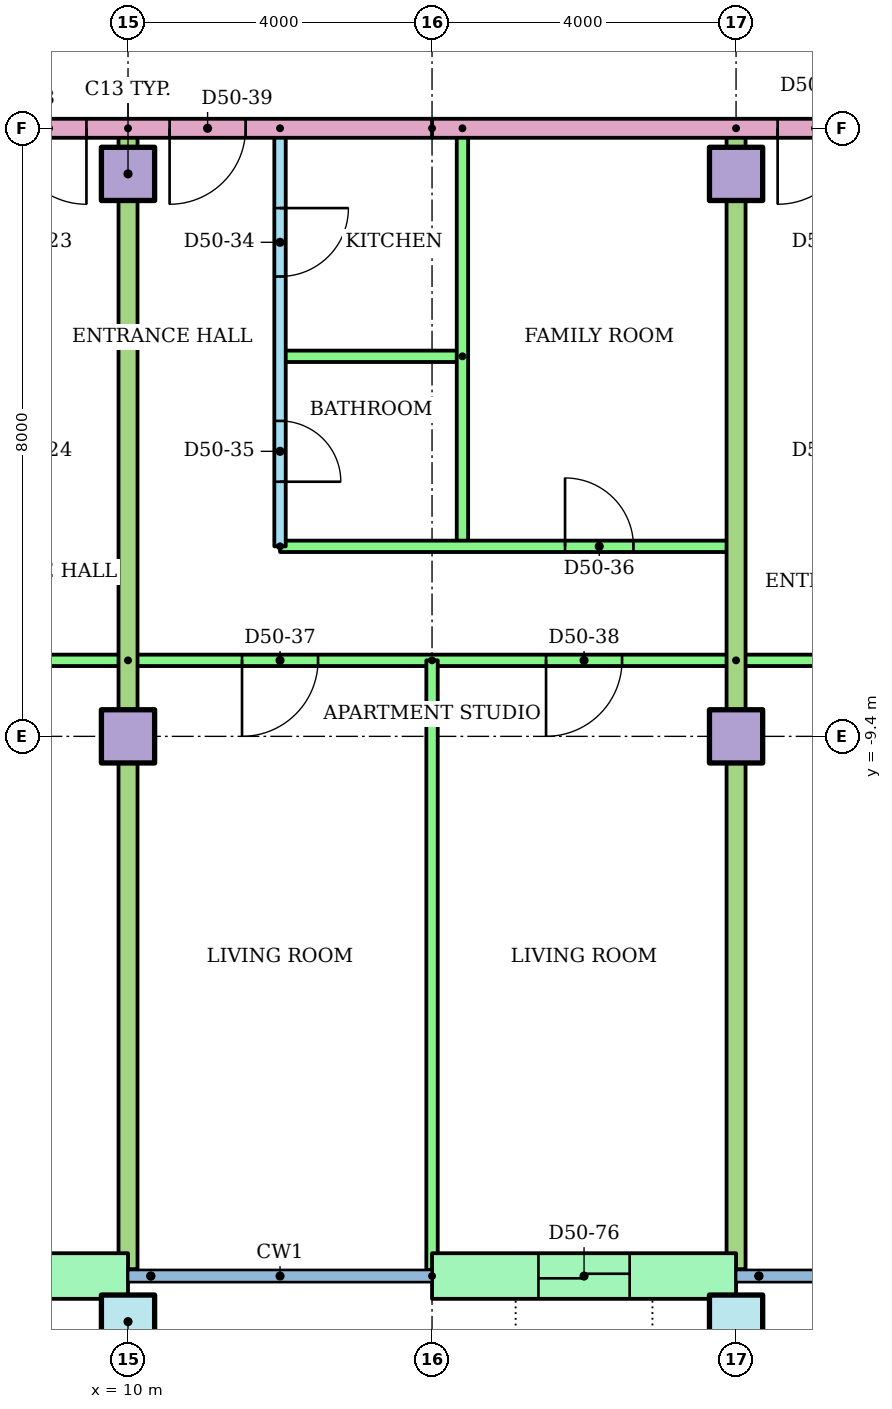
"""IFC4 building model, lengths in metres.
Left out: names, types, materials, properties, quantities, classifications, styles, units other than length and angle.
Written with IfcOpenShell. Run it as: python <this file> out.ifc"""

import sys

from ifc_helpers import new_model, si_unit, direction, frame, frame_2d, origin, origin_2d, place, context, subcontext, project, spatial, rectangle, hollow_rectangle, extrude, element, fill, save


model = new_model("IFC4")
c1 = context("Model", 3, precision=1e-05, world=origin(), true_north=direction((0.0, 1.0)))
c2 = subcontext(c1, "Body", "Model", "MODEL_VIEW")
j1 = project(units=[si_unit("LENGTHUNIT", "METRE"), si_unit("PLANEANGLEUNIT", "RADIAN")], contexts=[c1])
p1 = place(None, origin())
s1 = spatial("IfcSite", under=j1, at=p1, CompositionType="ELEMENT")
p2 = place(p1, origin())
s2 = spatial("IfcBuilding", under=s1, at=p2, CompositionType="ELEMENT")
p3 = place(p2, frame((0.0, 0.0, 190.9)))
s3 = spatial("IfcBuildingStorey", under=s2, at=p3, CompositionType="ELEMENT", Elevation=190.9)
for number, where in (
    (1, (10.0, -17.1, 0.0)),
    (2, (18.0, -17.1, 0.0)),
):
    element("IfcColumn", number, at=place(p3, frame(where)), inside=s3, PredefinedType="COLUMN", context=c2, shape_type="SweptSolid", body=[
        extrude(hollow_rectangle(XDim=0.7, YDim=0.7, WallThickness=0.036, at=origin_2d()), origin(), (0.0, 0.0, 1.0), 3.2),
    ])
for number, where in (
    (3, (10.0, -9.4, 0.0)),
    (4, (18.0, -9.4, 0.0)),
    (5, (10.0, -2.0, 0.0)),
    (6, (18.0, -2.0, 0.0)),
):
    element("IfcColumn", number, at=place(p3, frame(where)), inside=s3, PredefinedType="COLUMN", context=c2, shape_type="SweptSolid", body=[
        extrude(rectangle(XDim=0.7, YDim=0.7, at=origin_2d()), origin(), (0.0, 0.0, 1.0), 3.2),
    ])
p4 = place(p3, frame((6.0, -16.5, 0.0)))
e7 = element("IfcWall", 7, at=p4, inside=s3, PredefinedType="STANDARD", context=c2, shape_type="SweptSolid", body=[
    extrude(rectangle(XDim=4.0, YDim=0.6, at=frame_2d((2.0, 0.0))), origin(), (0.0, 0.0, 1.0), 2.8),
])
p5 = place(p4, frame((1.4, 0.0, 0.0)))
e8 = element("IfcOpeningElement", 8, at=p5, cuts=e7, PredefinedType="OPENING", context=c2, shape_type="SweptSolid", body=[
    extrude(rectangle(XDim=1.2, YDim=2.1, at=frame_2d((0.6, 1.05))), frame((0.0, 0.31, 0.0), z_axis=(0.0, -1.0, 0.0), x_axis=(1.0, 0.0, 0.0)), (0.0, 0.0, 1.0), 0.62),
])
p6 = place(p3, frame((14.0, -16.5, 0.0)))
e9 = element("IfcWall", 9, at=p6, inside=s3, PredefinedType="STANDARD", context=c2, shape_type="SweptSolid", body=[
    extrude(rectangle(XDim=4.0, YDim=0.6, at=frame_2d((2.0, 0.0))), origin(), (0.0, 0.0, 1.0), 2.8),
])
p7 = place(p6, frame((1.4, 0.0, 0.0)))
e10 = element("IfcOpeningElement", 10, at=p7, cuts=e9, PredefinedType="OPENING", context=c2, shape_type="SweptSolid", body=[
    extrude(rectangle(XDim=1.2, YDim=2.1, at=frame_2d((0.6, 1.05))), frame((0.0, 0.31, 0.0), z_axis=(0.0, -1.0, 0.0), x_axis=(1.0, 0.0, 0.0)), (0.0, 0.0, 1.0), 0.62),
])
p8 = place(p3, frame((10.0, -8.4, 0.0), z_axis=(0.0, 0.0, 1.0), x_axis=(-1.0, 0.0, 0.0)))
e11 = element("IfcWall", 11, at=p8, inside=s3, PredefinedType="PARTITIONING", context=c2, shape_type="SweptSolid", body=[
    extrude(rectangle(XDim=24.0, YDim=0.15, at=frame_2d((12.0, 0.0))), origin(), (0.0, 0.0, 1.0), 2.4),
])
p9 = place(p8, frame((19.5, 0.0, 0.0)))
e12 = element("IfcOpeningElement", 12, at=p9, cuts=e11, PredefinedType="OPENING", context=c2, shape_type="SweptSolid", body=[
    extrude(rectangle(XDim=1.0, YDim=2.1, at=frame_2d((0.5, 1.05))), frame((0.0, 0.085, 0.0), z_axis=(0.0, -1.0, 0.0), x_axis=(1.0, 0.0, 0.0)), (0.0, 0.0, 1.0), 0.17),
])
p10 = place(p8, frame((13.55, 0.0, 0.0)))
e13 = element("IfcOpeningElement", 13, at=p10, cuts=e11, PredefinedType="OPENING", context=c2, shape_type="SweptSolid", body=[
    extrude(rectangle(XDim=0.9, YDim=2.1, at=frame_2d((0.45, 1.05))), frame((0.0, 0.085, 0.0), z_axis=(0.0, -1.0, 0.0), x_axis=(1.0, 0.0, 0.0)), (0.0, 0.0, 1.0), 0.17),
])
p11 = place(p8, frame((9.55, 0.0, 0.0)))
e14 = element("IfcOpeningElement", 14, at=p11, cuts=e11, PredefinedType="OPENING", context=c2, shape_type="SweptSolid", body=[
    extrude(rectangle(XDim=0.9, YDim=2.1, at=frame_2d((0.45, 1.05))), frame((0.0, 0.085, 0.0), z_axis=(0.0, -1.0, 0.0), x_axis=(1.0, 0.0, 0.0)), (0.0, 0.0, 1.0), 0.17),
])
p12 = place(p8, frame((5.55, 0.0, 0.0)))
e15 = element("IfcOpeningElement", 15, at=p12, cuts=e11, PredefinedType="OPENING", context=c2, shape_type="SweptSolid", body=[
    extrude(rectangle(XDim=0.9, YDim=2.1, at=frame_2d((0.45, 1.05))), frame((0.0, 0.085, 0.0), z_axis=(0.0, -1.0, 0.0), x_axis=(1.0, 0.0, 0.0)), (0.0, 0.0, 1.0), 0.17),
])
p13 = place(p8, frame((1.55, 0.0, 0.0)))
e16 = element("IfcOpeningElement", 16, at=p13, cuts=e11, PredefinedType="OPENING", context=c2, shape_type="SweptSolid", body=[
    extrude(rectangle(XDim=0.9, YDim=2.1, at=frame_2d((0.45, 1.05))), frame((0.0, 0.085, 0.0), z_axis=(0.0, -1.0, 0.0), x_axis=(1.0, 0.0, 0.0)), (0.0, 0.0, 1.0), 0.17),
])
p14 = place(p3, frame((12.0, -1.4, 0.0), z_axis=(0.0, 0.0, 1.0), x_axis=(0.0, -1.0, 0.0)))
e17 = element("IfcWall", 17, at=p14, inside=s3, PredefinedType="PARTITIONING", context=c2, shape_type="SweptSolid", body=[
    extrude(rectangle(XDim=5.5, YDim=0.15, at=frame_2d((2.75, 0.0))), origin(), (0.0, 0.0, 1.0), 2.4),
])
p15 = place(p14, frame((1.05, 0.0, 0.0)))
e18 = element("IfcOpeningElement", 18, at=p15, cuts=e17, PredefinedType="OPENING", context=c2, shape_type="SweptSolid", body=[
    extrude(rectangle(XDim=0.9, YDim=2.1, at=frame_2d((0.45, 1.05))), frame((0.0, 0.085, 0.0), z_axis=(0.0, -1.0, 0.0), x_axis=(1.0, 0.0, 0.0)), (0.0, 0.0, 1.0), 0.17),
])
p16 = place(p14, frame((3.85, 0.0, 0.0)))
e19 = element("IfcOpeningElement", 19, at=p16, cuts=e17, PredefinedType="OPENING", context=c2, shape_type="SweptSolid", body=[
    extrude(rectangle(XDim=0.8, YDim=2.1, at=frame_2d((0.4, 1.05))), frame((0.0, 0.085, 0.0), z_axis=(0.0, -1.0, 0.0), x_axis=(1.0, 0.0, 0.0)), (0.0, 0.0, 1.0), 0.17),
])
p17 = place(p3, frame((14.4, -4.4, 0.0), z_axis=(0.0, 0.0, 1.0), x_axis=(-1.0, 0.0, 0.0)))
e20 = element("IfcWall", 20, at=p17, inside=s3, PredefinedType="PARTITIONING", context=c2, shape_type="SweptSolid", body=[
    extrude(rectangle(XDim=2.4, YDim=0.15, at=frame_2d((1.2, 0.0))), origin(), (0.0, 0.0, 1.0), 2.4),
])
p18 = place(p3, frame((14.4, -1.4, 0.0), z_axis=(0.0, 0.0, 1.0), x_axis=(0.0, -1.0, 0.0)))
e21 = element("IfcWall", 21, at=p18, inside=s3, PredefinedType="PARTITIONING", context=c2, shape_type="SweptSolid", body=[
    extrude(rectangle(XDim=5.5, YDim=0.15, at=frame_2d((2.75, 0.0))), origin(), (0.0, 0.0, 1.0), 2.4),
])
p19 = place(p3, frame((12.0, -6.9, 0.0)))
e22 = element("IfcWall", 22, at=p19, inside=s3, PredefinedType="PARTITIONING", context=c2, shape_type="SweptSolid", body=[
    extrude(rectangle(XDim=6.0, YDim=0.15, at=frame_2d((3.0, 0.0))), origin(), (0.0, 0.0, 1.0), 2.4),
])
p20 = place(p19, frame((3.75, 0.0, 0.0)))
e23 = element("IfcOpeningElement", 23, at=p20, cuts=e22, PredefinedType="OPENING", context=c2, shape_type="SweptSolid", body=[
    extrude(rectangle(XDim=0.9, YDim=2.1, at=frame_2d((0.45, 1.05))), frame((0.0, 0.085, 0.0), z_axis=(0.0, -1.0, 0.0), x_axis=(1.0, 0.0, 0.0)), (0.0, 0.0, 1.0), 0.17),
])
p21 = place(p3, frame((18.0, -8.4, 0.0), z_axis=(0.0, 0.0, 1.0), x_axis=(-1.0, 0.0, 0.0)))
e24 = element("IfcWall", 24, at=p21, inside=s3, PredefinedType="PARTITIONING", context=c2, shape_type="SweptSolid", body=[
    extrude(rectangle(XDim=8.0, YDim=0.15, at=frame_2d((4.0, 0.0))), origin(), (0.0, 0.0, 1.0), 2.4),
])
p22 = place(p21, frame((5.5, 0.0, 0.0)))
e25 = element("IfcOpeningElement", 25, at=p22, cuts=e24, PredefinedType="OPENING", context=c2, shape_type="SweptSolid", body=[
    extrude(rectangle(XDim=1.0, YDim=2.1, at=frame_2d((0.5, 1.05))), frame((0.0, 0.085, 0.0), z_axis=(0.0, -1.0, 0.0), x_axis=(1.0, 0.0, 0.0)), (0.0, 0.0, 1.0), 0.17),
])
p23 = place(p21, frame((1.5, 0.0, 0.0)))
e26 = element("IfcOpeningElement", 26, at=p23, cuts=e24, PredefinedType="OPENING", context=c2, shape_type="SweptSolid", body=[
    extrude(rectangle(XDim=1.0, YDim=2.1, at=frame_2d((0.5, 1.05))), frame((0.0, 0.085, 0.0), z_axis=(0.0, -1.0, 0.0), x_axis=(1.0, 0.0, 0.0)), (0.0, 0.0, 1.0), 0.17),
])
p24 = place(p3, frame((14.0, -8.4, 0.0), z_axis=(0.0, 0.0, 1.0), x_axis=(0.0, -1.0, 0.0)))
e27 = element("IfcWall", 27, at=p24, inside=s3, PredefinedType="PARTITIONING", context=c2, shape_type="SweptSolid", body=[
    extrude(rectangle(XDim=8.021, YDim=0.15, at=frame_2d((4.01, 0.0))), origin(), (0.0, 0.0, 1.0), 2.4),
])
p25 = place(p3, frame((10.0, -1.4, 0.0), z_axis=(0.0, 0.0, 1.0), x_axis=(0.0, -1.0, 0.0)))
e28 = element("IfcWall", 28, at=p25, inside=s3, PredefinedType="PARTITIONING", context=c2, shape_type="SweptSolid", body=[
    extrude(rectangle(XDim=15.01, YDim=0.25, at=frame_2d((7.505, 0.0))), origin(), (0.0, 0.0, 1.0), 2.4),
])
p26 = place(p3, frame((36.82, -8.4, 0.0), z_axis=(0.0, 0.0, 1.0), x_axis=(-1.0, 0.0, 0.0)))
e29 = element("IfcWall", 29, at=p26, inside=s3, PredefinedType="PARTITIONING", context=c2, shape_type="SweptSolid", body=[
    extrude(rectangle(XDim=18.82, YDim=0.15, at=frame_2d((9.41, 0.0))), origin(), (0.0, 0.0, 1.0), 2.4),
])
p27 = place(p26, frame((16.37, 0.0, 0.0)))
e30 = element("IfcOpeningElement", 30, at=p27, cuts=e29, PredefinedType="OPENING", context=c2, shape_type="SweptSolid", body=[
    extrude(rectangle(XDim=0.9, YDim=2.1, at=frame_2d((0.45, 1.05))), frame((0.0, 0.085, 0.0), z_axis=(0.0, -1.0, 0.0), x_axis=(1.0, 0.0, 0.0)), (0.0, 0.0, 1.0), 0.17),
])
p28 = place(p26, frame((12.37, 0.0, 0.0)))
e31 = element("IfcOpeningElement", 31, at=p28, cuts=e29, PredefinedType="OPENING", context=c2, shape_type="SweptSolid", body=[
    extrude(rectangle(XDim=0.9, YDim=2.1, at=frame_2d((0.45, 1.05))), frame((0.0, 0.085, 0.0), z_axis=(0.0, -1.0, 0.0), x_axis=(1.0, 0.0, 0.0)), (0.0, 0.0, 1.0), 0.17),
])
p29 = place(p26, frame((7.27, 0.0, 0.0)))
e32 = element("IfcOpeningElement", 32, at=p29, cuts=e29, PredefinedType="OPENING", context=c2, shape_type="SweptSolid", body=[
    extrude(rectangle(XDim=1.0, YDim=2.1, at=frame_2d((0.5, 1.05))), frame((0.0, 0.085, 0.0), z_axis=(0.0, -1.0, 0.0), x_axis=(1.0, 0.0, 0.0)), (0.0, 0.0, 1.0), 0.17),
])
p30 = place(p26, frame((1.373, 0.0, 0.0)))
e33 = element("IfcOpeningElement", 33, at=p30, cuts=e29, PredefinedType="OPENING", context=c2, shape_type="SweptSolid", body=[
    extrude(rectangle(XDim=0.9, YDim=2.1, at=frame_2d((0.45, 1.05))), frame((0.0, 0.085, 0.0), z_axis=(0.0, -1.0, 0.0), x_axis=(1.0, 0.0, 0.0)), (0.0, 0.0, 1.0), 0.17),
])
p31 = place(p3, frame((18.0, -1.4, 0.0), z_axis=(0.0, 0.0, 1.0), x_axis=(0.0, -1.0, 0.0)))
e34 = element("IfcWall", 34, at=p31, inside=s3, PredefinedType="PARTITIONING", context=c2, shape_type="SweptSolid", body=[
    extrude(rectangle(XDim=15.01, YDim=0.25, at=frame_2d((7.505, 0.0))), origin(), (0.0, 0.0, 1.0), 2.4),
])
p32 = place(p3, frame((29.0, -1.4, 0.0), z_axis=(0.0, 0.0, 1.0), x_axis=(-1.0, 0.0, 0.0)))
e35 = element("IfcWall", 35, at=p32, inside=s3, PredefinedType="PARTITIONING", context=c2, shape_type="SweptSolid", body=[
    extrude(rectangle(XDim=15.0, YDim=0.25, at=frame_2d((7.5, 0.0))), origin(), (0.0, 0.0, 1.0), 2.4),
])
p33 = place(p32, frame((9.453, 0.0, 0.0)))
e36 = element("IfcOpeningElement", 36, at=p33, cuts=e35, PredefinedType="OPENING", context=c2, shape_type="SweptSolid", body=[
    extrude(rectangle(XDim=1.0, YDim=2.1, at=frame_2d((0.5, 1.05))), frame((0.0, 0.135, 0.0), z_axis=(0.0, -1.0, 0.0), x_axis=(1.0, 0.0, 0.0)), (0.0, 0.0, 1.0), 0.27),
])
p34 = place(p3, frame((14.0, -1.4, 0.0), z_axis=(0.0, 0.0, 1.0), x_axis=(-1.0, 0.0, 0.0)))
e37 = element("IfcWall", 37, at=p34, inside=s3, PredefinedType="PARTITIONING", context=c2, shape_type="SweptSolid", body=[
    extrude(rectangle(XDim=28.0, YDim=0.25, at=frame_2d((14.0, 0.0))), origin(), (0.0, 0.0, 1.0), 2.4),
])
p35 = place(p34, frame((4.547, 0.0, 0.0)))
e38 = element("IfcOpeningElement", 38, at=p35, cuts=e37, PredefinedType="OPENING", context=c2, shape_type="SweptSolid", body=[
    extrude(rectangle(XDim=1.0, YDim=2.1, at=frame_2d((0.5, 1.05))), frame((0.0, 0.135, 0.0), z_axis=(0.0, -1.0, 0.0), x_axis=(1.0, 0.0, 0.0)), (0.0, 0.0, 1.0), 0.27),
])
p36 = place(p34, frame((2.453, 0.0, 0.0)))
e39 = element("IfcOpeningElement", 39, at=p36, cuts=e37, PredefinedType="OPENING", context=c2, shape_type="SweptSolid", body=[
    extrude(rectangle(XDim=1.0, YDim=2.1, at=frame_2d((0.5, 1.05))), frame((0.0, 0.135, 0.0), z_axis=(0.0, -1.0, 0.0), x_axis=(1.0, 0.0, 0.0)), (0.0, 0.0, 1.0), 0.27),
])
p37 = place(p35, origin())
e40 = element("IfcDoor", 40, at=p37, inside=s3, OperationType="SINGLE_SWING_LEFT", PredefinedType="DOOR", context=c2, shape_type="SweptSolid", body=[
    extrude(rectangle(XDim=1.0, YDim=2.1, at=frame_2d((0.5, 1.05))), frame((0.0, 0.025, 0.0), z_axis=(0.0, -1.0, 0.0), x_axis=(1.0, 0.0, 0.0)), (0.0, 0.0, 1.0), 0.05),
])
fill(e38, e40)
p38 = place(p15, origin())
e41 = element("IfcDoor", 41, at=p38, inside=s3, OperationType="SINGLE_SWING_LEFT", PredefinedType="DOOR", context=c2, shape_type="SweptSolid", body=[
    extrude(rectangle(XDim=0.9, YDim=2.1, at=frame_2d((0.45, 1.05))), frame((0.0, 0.025, 0.0), z_axis=(0.0, -1.0, 0.0), x_axis=(1.0, 0.0, 0.0)), (0.0, 0.0, 1.0), 0.05),
])
fill(e18, e41)
p39 = place(p16, origin())
e42 = element("IfcDoor", 42, at=p39, inside=s3, OperationType="SINGLE_SWING_RIGHT", PredefinedType="DOOR", context=c2, shape_type="SweptSolid", body=[
    extrude(rectangle(XDim=0.8, YDim=2.1, at=frame_2d((0.4, 1.05))), frame((0.0, 0.025, 0.0), z_axis=(0.0, -1.0, 0.0), x_axis=(1.0, 0.0, 0.0)), (0.0, 0.0, 1.0), 0.05),
])
fill(e19, e42)
p40 = place(p20, origin())
e43 = element("IfcDoor", 43, at=p40, inside=s3, OperationType="SINGLE_SWING_LEFT", PredefinedType="DOOR", context=c2, shape_type="SweptSolid", body=[
    extrude(rectangle(XDim=0.9, YDim=2.1, at=frame_2d((0.45, 1.05))), frame((0.0, 0.025, 0.0), z_axis=(0.0, -1.0, 0.0), x_axis=(1.0, 0.0, 0.0)), (0.0, 0.0, 1.0), 0.05),
])
fill(e23, e43)
p41 = place(p22, origin())
e44 = element("IfcDoor", 44, at=p41, inside=s3, OperationType="SINGLE_SWING_RIGHT", PredefinedType="DOOR", context=c2, shape_type="SweptSolid", body=[
    extrude(rectangle(XDim=1.0, YDim=2.1, at=frame_2d((0.5, 1.05))), frame((0.0, 0.025, 0.0), z_axis=(0.0, -1.0, 0.0), x_axis=(1.0, 0.0, 0.0)), (0.0, 0.0, 1.0), 0.05),
])
fill(e25, e44)
p42 = place(p23, origin())
e45 = element("IfcDoor", 45, at=p42, inside=s3, OperationType="SINGLE_SWING_RIGHT", PredefinedType="DOOR", context=c2, shape_type="SweptSolid", body=[
    extrude(rectangle(XDim=1.0, YDim=2.1, at=frame_2d((0.5, 1.05))), frame((0.0, 0.025, 0.0), z_axis=(0.0, -1.0, 0.0), x_axis=(1.0, 0.0, 0.0)), (0.0, 0.0, 1.0), 0.05),
])
fill(e26, e45)
p43 = place(p36, origin())
e46 = element("IfcDoor", 46, at=p43, inside=s3, OperationType="SINGLE_SWING_RIGHT", PredefinedType="DOOR", context=c2, shape_type="SweptSolid", body=[
    extrude(rectangle(XDim=1.0, YDim=2.1, at=frame_2d((0.5, 1.05))), frame((0.0, 0.025, 0.0), z_axis=(0.0, -1.0, 0.0), x_axis=(1.0, 0.0, 0.0)), (0.0, 0.0, 1.0), 0.05),
])
fill(e39, e46)
p44 = place(p33, origin())
e47 = element("IfcDoor", 47, at=p44, inside=s3, OperationType="SINGLE_SWING_RIGHT", PredefinedType="DOOR", context=c2, shape_type="SweptSolid", body=[
    extrude(rectangle(XDim=1.0, YDim=2.1, at=frame_2d((0.5, 1.05))), frame((0.0, 0.025, 0.0), z_axis=(0.0, -1.0, 0.0), x_axis=(1.0, 0.0, 0.0)), (0.0, 0.0, 1.0), 0.05),
])
fill(e36, e47)
p45 = place(p7, origin())
e48 = element("IfcDoor", 48, at=p45, inside=s3, OperationType="SLIDING_TO_LEFT", PredefinedType="DOOR", context=c2, shape_type="SweptSolid", body=[
    extrude(rectangle(XDim=1.2, YDim=2.1, at=frame_2d((0.6, 1.05))), frame((0.0, 0.025, 0.0), z_axis=(0.0, -1.0, 0.0), x_axis=(1.0, 0.0, 0.0)), (0.0, 0.0, 1.0), 0.05),
])
fill(e10, e48)
save(model, sys.argv[1])
